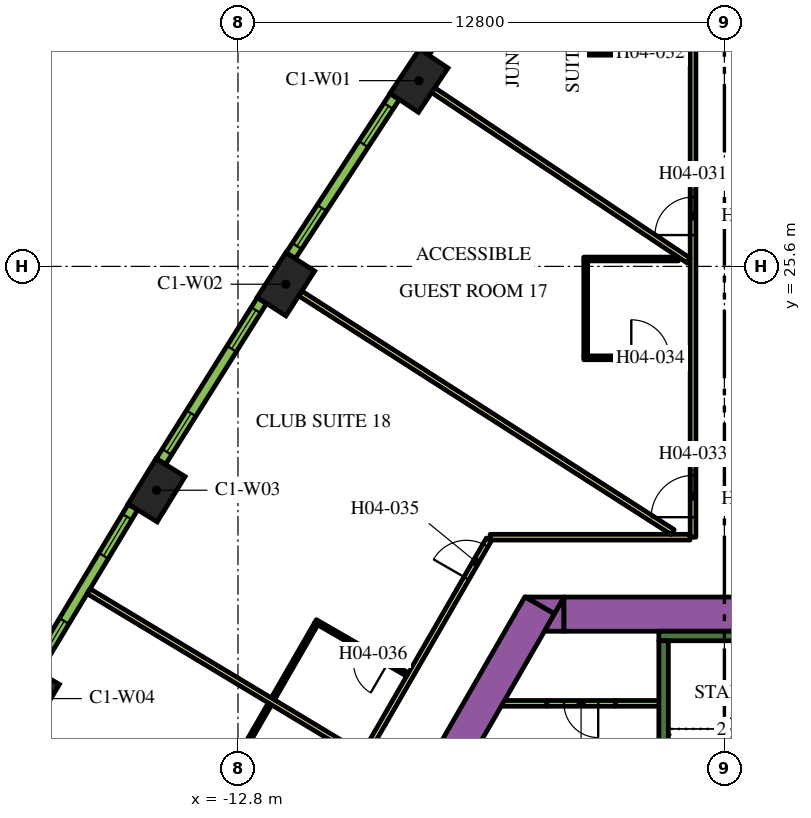
"""IFC4 building model, lengths in metres.
Left out: names, types, materials, properties, quantities, classifications, styles, units other than length and angle.
Written with IfcOpenShell. Run it as: python <this file> out.ifc"""

import sys

from ifc_helpers import new_model, si_unit, direction, frame, frame_2d, origin, origin_2d, place, context, subcontext, project, spatial, polyline, rectangle, outline, extrude, element, fill, save


model = new_model("IFC4")
c1 = context("Model", 3, precision=1e-05, world=origin(), true_north=direction((0.0, 1.0)))
c2 = subcontext(c1, "Body", "Model", "MODEL_VIEW")
j1 = project(units=[si_unit("LENGTHUNIT", "METRE"), si_unit("PLANEANGLEUNIT", "RADIAN")], contexts=[c1])
p1 = place(None, origin())
s1 = spatial("IfcSite", under=j1, at=p1, CompositionType="ELEMENT")
p2 = place(p1, origin())
s2 = spatial("IfcBuilding", under=s1, at=p2, CompositionType="ELEMENT")
p3 = place(p2, frame((0.0, 0.0, 66.6)))
s3 = spatial("IfcBuildingStorey", under=s2, at=p3, CompositionType="ELEMENT", Elevation=66.6)
for number, where, z_axis, x_axis in (
    (1, (-8.037, 30.487, 0.0), (0.0, 0.0, 1.0), (-0.555, -0.832, 0.0)),
    (2, (-11.539, 25.131, 0.0), (0.0, 0.0, 1.0), (-0.539, -0.842, 0.0)),
    (3, (-14.942, 19.71, 0.0), (0.0, 0.0, 1.0), (-0.524, -0.852, 0.0)),
    (4, (-18.243, 14.228, 0.0), (0.0, 0.0, 1.0), (-0.508, -0.861, 0.0)),
):
    element("IfcColumn", number, at=place(p3, frame(where, z_axis=z_axis, x_axis=x_axis)), inside=s3, PredefinedType="COLUMN", context=c2, shape_type="SweptSolid", body=[
        extrude(rectangle(XDim=1.4, YDim=0.9, at=origin_2d()), origin(), (0.0, 0.0, 1.0), 3.9),
    ])
p4 = place(p3, frame((-15.36, -1.503, 0.0), z_axis=(0.0, 0.0, 1.0), x_axis=(0.50000389221, 0.866023156604, 0.0)))
e5 = element("IfcWall", 5, at=p4, inside=s3, PredefinedType="SOLIDWALL", context=c2, shape_type="SweptSolid", body=[
    extrude(rectangle(XDim=21.0, YDim=0.9, at=frame_2d((10.5, 0.0))), origin(), (0.0, 0.0, 1.0), 3.9),
])
p5 = place(p3, origin())
e6 = element("IfcWall", 6, at=p5, inside=s3, PredefinedType="SOLIDWALL", context=c2, shape_type="SweptSolid", body=[
    extrude(outline(polyline([(-4.215, 16.9), (-4.469, 16.46), (-5.231, 16.9), (-4.215, 16.9)])), origin(), (0.0, 0.0, 1.0), 3.9),
])
p6 = place(p3, frame((-4.224, 16.45, 0.0), z_axis=(0.0, 0.0, 1.0), x_axis=(1.0, 0.0, 0.0)))
e7 = element("IfcWall", 7, at=p6, inside=s3, PredefinedType="SOLIDWALL", context=c2, shape_type="SweptSolid", body=[
    extrude(rectangle(XDim=9.488, YDim=0.9, at=frame_2d((4.744, 0.0))), origin(), (0.0, 0.0, 1.0), 3.9),
])
e8 = element("IfcWall", 8, at=p5, inside=s3, PredefinedType="SOLIDWALL", context=c2, shape_type="SweptSolid", body=[
    extrude(outline(polyline([(-4.734, 16.0), (-4.226, 16.88), (-4.226, 16.0), (-4.734, 16.0)])), origin(), (0.0, 0.0, 1.0), 3.9),
])
p7 = place(p3, frame((-1.725, 15.875, 0.0), z_axis=(0.0, 0.0, 1.0), x_axis=(1.0, 0.0, 0.0)))
e9 = element("IfcWall", 9, at=p7, inside=s3, PredefinedType="SOLIDWALL", context=c2, shape_type="SweptSolid", body=[
    extrude(rectangle(XDim=3.45, YDim=0.25, at=frame_2d((1.725, 0.0))), origin(), (0.0, 0.0, 1.0), 3.9),
])
p8 = place(p3, frame((-1.6, 8.7, 0.0), z_axis=(0.0, 0.0, 1.0), x_axis=(0.0, 1.0, 0.0)))
e10 = element("IfcWall", 10, at=p8, inside=s3, PredefinedType="SOLIDWALL", context=c2, shape_type="SweptSolid", body=[
    extrude(rectangle(XDim=7.05, YDim=0.25, at=frame_2d((3.525, 0.0))), origin(), (0.0, 0.0, 1.0), 3.9),
])
p9 = place(p3, frame((-5.851, 14.102, 0.0), z_axis=(0.0, 0.0, 1.0), x_axis=(1.0, 0.0, 0.0)))
e11 = element("IfcWall", 11, at=p9, inside=s3, PredefinedType="PARTITIONING", context=c2, shape_type="SweptSolid", body=[
    extrude(rectangle(XDim=1.18, YDim=0.15, at=frame_2d((0.59, 0.0))), origin(), (0.0, 0.0, 1.0), 2.75),
])
p10 = place(p3, frame((-2.871, 14.102, 0.0), z_axis=(0.0, 0.0, 1.0), x_axis=(1.0, 0.0, 0.0)))
e12 = element("IfcWall", 12, at=p10, inside=s3, PredefinedType="PARTITIONING", context=c2, shape_type="SweptSolid", body=[
    extrude(rectangle(XDim=1.196, YDim=0.15, at=frame_2d((0.598, 0.0))), origin(), (0.0, 0.0, 1.0), 2.75),
])
p11 = place(p3, frame((-2.871, 14.102, 0.0), z_axis=(0.0, 0.0, 1.0), x_axis=(-1.0, 0.0, 0.0)))
e13 = element("IfcWall", 13, at=p11, inside=s3, PredefinedType="PARTITIONING", context=c2, shape_type="SweptSolid", body=[
    extrude(rectangle(XDim=1.8, YDim=0.15, at=frame_2d((0.9, 0.0))), origin(), (0.0, 0.0, 1.0), 2.75),
])
p12 = place(p11, frame((0.45, 0.0, 0.0)))
e14 = element("IfcOpeningElement", 14, at=p12, cuts=e13, PredefinedType="OPENING", context=c2, shape_type="SweptSolid", body=[
    extrude(rectangle(XDim=0.9, YDim=2.1, at=frame_2d((0.45, 1.05))), frame((0.0, 0.085, 0.0), z_axis=(0.0, -1.0, 0.0), x_axis=(1.0, 0.0, 0.0)), (0.0, 0.0, 1.0), 0.17),
])
p13 = place(p3, frame((-0.825, 18.475, 0.0), z_axis=(0.0, 0.0, 1.0), x_axis=(0.0, 1.0, 0.0)))
e15 = element("IfcWall", 15, at=p13, inside=s3, PredefinedType="PARTITIONING", context=c2, shape_type="SweptSolid", body=[
    extrude(rectangle(XDim=16.224, YDim=0.15, at=frame_2d((8.112, 0.0))), origin(), (0.0, 0.0, 1.0), 2.75),
])
p14 = place(p13, frame((7.949, 0.0, 0.0)))
e16 = element("IfcOpeningElement", 16, at=p14, cuts=e15, PredefinedType="OPENING", context=c2, shape_type="SweptSolid", body=[
    extrude(rectangle(XDim=1.0, YDim=2.1, at=frame_2d((0.5, 1.05))), frame((0.0, 0.085, 0.0), z_axis=(0.0, -1.0, 0.0), x_axis=(1.0, 0.0, 0.0)), (0.0, 0.0, 1.0), 0.17),
])
p15 = place(p13, frame((0.526, 0.0, 0.0)))
e17 = element("IfcOpeningElement", 17, at=p15, cuts=e15, PredefinedType="OPENING", context=c2, shape_type="SweptSolid", body=[
    extrude(rectangle(XDim=1.1, YDim=2.1, at=frame_2d((0.55, 1.05))), frame((0.0, 0.085, 0.0), z_axis=(0.0, -1.0, 0.0), x_axis=(1.0, 0.0, 0.0)), (0.0, 0.0, 1.0), 0.17),
])
p16 = place(p3, frame((-6.163, 18.475, 0.0), z_axis=(0.0, 0.0, 1.0), x_axis=(1.0, 0.0, 0.0)))
e18 = element("IfcWall", 18, at=p16, inside=s3, PredefinedType="PARTITIONING", context=c2, shape_type="SweptSolid", body=[
    extrude(rectangle(XDim=5.258, YDim=0.15, at=frame_2d((2.629, 0.0))), origin(), (0.0, 0.0, 1.0), 2.75),
])
p17 = place(p3, frame((-19.081, -3.9, 0.0), z_axis=(0.0, 0.0, 1.0), x_axis=(0.499998313975, 0.866026377209, 0.0)))
e19 = element("IfcWall", 19, at=p17, inside=s3, PredefinedType="PARTITIONING", context=c2, shape_type="SweptSolid", body=[
    extrude(rectangle(XDim=25.766, YDim=0.15, at=frame_2d((12.883, 0.0))), origin(), (0.0, 0.0, 1.0), 2.75),
])
p18 = place(p17, frame((24.586, 0.0, 0.0)))
e20 = element("IfcOpeningElement", 20, at=p18, cuts=e19, PredefinedType="OPENING", context=c2, shape_type="SweptSolid", body=[
    extrude(rectangle(XDim=1.0, YDim=2.1, at=frame_2d((0.5, 1.05))), frame((0.0, 0.085, 0.0), z_axis=(0.0, -1.0, 0.0), x_axis=(1.0, 0.0, 0.0)), (0.0, 0.0, 1.0), 0.17),
])
p19 = place(p17, frame((9.948, 0.0, 0.0)))
e21 = element("IfcOpeningElement", 21, at=p19, cuts=e19, PredefinedType="OPENING", context=c2, shape_type="SweptSolid", body=[
    extrude(rectangle(XDim=1.0, YDim=2.1, at=frame_2d((0.5, 1.05))), frame((0.0, 0.085, 0.0), z_axis=(0.0, -1.0, 0.0), x_axis=(1.0, 0.0, 0.0)), (0.0, 0.0, 1.0), 0.17),
])
p20 = place(p17, frame((7.782, 0.0, 0.0)))
e22 = element("IfcOpeningElement", 22, at=p20, cuts=e19, PredefinedType="OPENING", context=c2, shape_type="SweptSolid", body=[
    extrude(rectangle(XDim=0.9, YDim=2.1, at=frame_2d((0.45, 1.05))), frame((0.0, 0.085, 0.0), z_axis=(0.0, -1.0, 0.0), x_axis=(1.0, 0.0, 0.0)), (0.0, 0.0, 1.0), 0.17),
])
p21 = place(p17, frame((4.658, 0.0, 0.0)))
e23 = element("IfcOpeningElement", 23, at=p21, cuts=e19, PredefinedType="OPENING", context=c2, shape_type="SweptSolid", body=[
    extrude(rectangle(XDim=0.9, YDim=2.1, at=frame_2d((0.45, 1.05))), frame((0.0, 0.085, 0.0), z_axis=(0.0, -1.0, 0.0), x_axis=(1.0, 0.0, 0.0)), (0.0, 0.0, 1.0), 0.17),
])
p22 = place(p3, frame((-16.729, 17.052, 0.0), z_axis=(0.0, 0.0, 1.0), x_axis=(0.856630606266, -0.515930232113, 0.0)))
e24 = element("IfcWall", 24, at=p22, inside=s3, PredefinedType="PARTITIONING", context=c2, shape_type="SweptSolid", body=[
    extrude(rectangle(XDim=8.355, YDim=0.15, at=frame_2d((4.178, 0.0))), origin(), (0.0, 0.0, 1.0), 2.75),
])
p23 = place(p3, frame((-11.16, 24.888, 0.0), z_axis=(0.0, 0.0, 1.0), x_axis=(0.84199813156, -0.539480441211, 0.0)))
e25 = element("IfcWall", 25, at=p23, inside=s3, PredefinedType="PARTITIONING", context=c2, shape_type="SweptSolid", body=[
    extrude(rectangle(XDim=11.638, YDim=0.15, at=frame_2d((5.819, 0.0))), origin(), (0.0, 0.0, 1.0), 2.75),
])
p24 = place(p3, frame((-7.662, 30.238, 0.0), z_axis=(0.0, 0.0, 1.0), x_axis=(0.831882886825, -0.554951225431, 0.0)))
e26 = element("IfcWall", 26, at=p24, inside=s3, PredefinedType="PARTITIONING", context=c2, shape_type="SweptSolid", body=[
    extrude(rectangle(XDim=8.079, YDim=0.15, at=frame_2d((4.04, 0.0))), origin(), (0.0, 0.0, 1.0), 2.75),
])
p25 = place(p3, frame((-3.6, 31.208, 0.0), z_axis=(0.0, 0.0, 1.0), x_axis=(1.0, 0.0, 0.0)))
e27 = element("IfcWall", 27, at=p25, inside=s3, PredefinedType="PARTITIONING", context=c2, shape_type="SweptSolid", body=[
    extrude(rectangle(XDim=2.7, YDim=0.1, at=frame_2d((1.35, 0.0))), origin(), (0.0, 0.0, 1.0), 2.75),
])
p26 = place(p25, frame((1.2, 0.0, 0.0)))
e28 = element("IfcOpeningElement", 28, at=p26, cuts=e27, PredefinedType="OPENING", context=c2, shape_type="SweptSolid", body=[
    extrude(rectangle(XDim=0.9, YDim=2.1, at=frame_2d((0.45, 1.05))), frame((0.0, 0.06, 0.0), z_axis=(0.0, -1.0, 0.0), x_axis=(1.0, 0.0, 0.0)), (0.0, 0.0, 1.0), 0.12),
])
p27 = place(p3, frame((-3.7, 23.195, 0.0), z_axis=(0.0, 0.0, 1.0), x_axis=(1.0, 0.0, 0.0)))
e29 = element("IfcWall", 29, at=p27, inside=s3, PredefinedType="PARTITIONING", context=c2, shape_type="SweptSolid", body=[
    extrude(rectangle(XDim=2.8, YDim=0.1, at=frame_2d((1.4, 0.0))), origin(), (0.0, 0.0, 1.0), 2.75),
])
p28 = place(p27, frame((1.25, 0.0, 0.0)))
e30 = element("IfcOpeningElement", 30, at=p28, cuts=e29, PredefinedType="OPENING", context=c2, shape_type="SweptSolid", body=[
    extrude(rectangle(XDim=1.0, YDim=2.1, at=frame_2d((0.5, 1.05))), frame((0.0, 0.06, 0.0), z_axis=(0.0, -1.0, 0.0), x_axis=(1.0, 0.0, 0.0)), (0.0, 0.0, 1.0), 0.12),
])
p29 = place(p3, frame((-3.65, 23.245, 0.0), z_axis=(0.0, 0.0, 1.0), x_axis=(0.0, 1.0, 0.0)))
e31 = element("IfcWall", 31, at=p29, inside=s3, PredefinedType="PARTITIONING", context=c2, shape_type="SweptSolid", body=[
    extrude(rectangle(XDim=2.5, YDim=0.1, at=frame_2d((1.25, 0.0))), origin(), (0.0, 0.0, 1.0), 2.75),
])
p30 = place(p3, frame((-1.21, 25.795, 0.0), z_axis=(0.0, 0.0, 1.0), x_axis=(-1.0, 0.0, 0.0)))
e32 = element("IfcWall", 32, at=p30, inside=s3, PredefinedType="PARTITIONING", context=c2, shape_type="SweptSolid", body=[
    extrude(rectangle(XDim=2.49, YDim=0.1, at=frame_2d((1.245, 0.0))), origin(), (0.0, 0.0, 1.0), 2.75),
])
p31 = place(p3, frame((-8.337, 14.861, 0.0), z_axis=(0.0, 0.0, 1.0), x_axis=(-0.866034573852, 0.49998411664, 0.0)))
e33 = element("IfcWall", 33, at=p31, inside=s3, PredefinedType="PARTITIONING", context=c2, shape_type="SweptSolid", body=[
    extrude(rectangle(XDim=2.8, YDim=0.1, at=frame_2d((1.4, 0.0))), origin(), (0.0, 0.0, 1.0), 2.75),
])
p32 = place(p31, frame((0.6, 0.0, 0.0)))
e34 = element("IfcOpeningElement", 34, at=p32, cuts=e33, PredefinedType="OPENING", context=c2, shape_type="SweptSolid", body=[
    extrude(rectangle(XDim=0.9, YDim=2.1, at=frame_2d((0.45, 1.05))), frame((0.0, 0.06, 0.0), z_axis=(0.0, -1.0, 0.0), x_axis=(1.0, 0.0, 0.0)), (0.0, 0.0, 1.0), 0.12),
])
p33 = place(p3, frame((-10.743, 16.192, 0.0), z_axis=(0.0, 0.0, 1.0), x_axis=(-0.500014167291, -0.866017224141, 0.0)))
e35 = element("IfcWall", 35, at=p33, inside=s3, PredefinedType="PARTITIONING", context=c2, shape_type="SweptSolid", body=[
    extrude(rectangle(XDim=2.27, YDim=0.1, at=frame_2d((1.135, 0.0))), origin(), (0.0, 0.0, 1.0), 2.75),
])
p34 = place(p3, frame((-13.147, 12.029, 0.0), z_axis=(0.0, 0.0, 1.0), x_axis=(0.499939447199, 0.866060361138, 0.0)))
e36 = element("IfcWall", 36, at=p34, inside=s3, PredefinedType="PARTITIONING", context=c2, shape_type="SweptSolid", body=[
    extrude(rectangle(XDim=2.37, YDim=0.1, at=frame_2d((1.185, 0.0))), origin(), (0.0, 0.0, 1.0), 2.75),
])
p35 = place(p3, frame((-5.078, 35.376, 0.0), z_axis=(0.0, 0.0, 1.0), x_axis=(-0.562610153679, -0.826722332454, 0.0)))
e37 = element("IfcWall", 37, at=p35, inside=s3, PredefinedType="SOLIDWALL", context=c2, shape_type="SweptSolid", body=[
    extrude(rectangle(XDim=5.006, YDim=0.29, at=frame_2d((2.503, 0.0))), origin(), (0.0, 0.0, 1.0), 3.65),
])
p36 = place(p35, frame((0.265, 0.0, 0.9)))
e38 = element("IfcOpeningElement", 38, at=p36, cuts=e37, PredefinedType="OPENING", context=c2, shape_type="SweptSolid", body=[
    extrude(rectangle(XDim=1.2, YDim=2.15, at=frame_2d((0.6, 1.075))), frame((0.0, 0.155, 0.0), z_axis=(0.0, -1.0, 0.0), x_axis=(1.0, 0.0, 0.0)), (0.0, 0.0, 1.0), 0.31),
])
p37 = place(p35, frame((3.495, 0.0, 0.9)))
e39 = element("IfcOpeningElement", 39, at=p37, cuts=e37, PredefinedType="OPENING", context=c2, shape_type="SweptSolid", body=[
    extrude(rectangle(XDim=1.2, YDim=2.15, at=frame_2d((0.6, 1.075))), frame((0.0, 0.155, 0.0), z_axis=(0.0, -1.0, 0.0), x_axis=(1.0, 0.0, 0.0)), (0.0, 0.0, 1.0), 0.31),
])
p38 = place(p3, frame((-8.676, 30.068, 0.0), z_axis=(0.0, 0.0, 1.0), x_axis=(-0.547204617628, -0.836998868845, 0.0)))
e40 = element("IfcWall", 40, at=p38, inside=s3, PredefinedType="SOLIDWALL", context=c2, shape_type="SweptSolid", body=[
    extrude(rectangle(XDim=4.998, YDim=0.29, at=frame_2d((2.499, 0.0))), origin(), (0.0, 0.0, 1.0), 3.65),
])
p39 = place(p38, frame((0.297, 0.0, 0.9)))
e41 = element("IfcOpeningElement", 41, at=p39, cuts=e40, PredefinedType="OPENING", context=c2, shape_type="SweptSolid", body=[
    extrude(rectangle(XDim=1.2, YDim=2.15, at=frame_2d((0.6, 1.075))), frame((0.0, 0.155, 0.0), z_axis=(0.0, -1.0, 0.0), x_axis=(1.0, 0.0, 0.0)), (0.0, 0.0, 1.0), 0.31),
])
p40 = place(p38, frame((3.501, 0.0, 0.9)))
e42 = element("IfcOpeningElement", 42, at=p40, cuts=e40, PredefinedType="OPENING", context=c2, shape_type="SweptSolid", body=[
    extrude(rectangle(XDim=1.2, YDim=2.15, at=frame_2d((0.6, 1.075))), frame((0.0, 0.155, 0.0), z_axis=(0.0, -1.0, 0.0), x_axis=(1.0, 0.0, 0.0)), (0.0, 0.0, 1.0), 0.31),
])
p41 = place(p3, frame((-12.17, 24.699, 0.0), z_axis=(0.0, 0.0, 1.0), x_axis=(-0.531688286542, -0.846940119462, 0.0)))
e43 = element("IfcWall", 43, at=p41, inside=s3, PredefinedType="SOLIDWALL", context=c2, shape_type="SweptSolid", body=[
    extrude(rectangle(XDim=4.998, YDim=0.29, at=frame_2d((2.499, 0.0))), origin(), (0.0, 0.0, 1.0), 3.65),
])
p42 = place(p41, frame((0.297, 0.0, 0.9)))
e44 = element("IfcOpeningElement", 44, at=p42, cuts=e43, PredefinedType="OPENING", context=c2, shape_type="SweptSolid", body=[
    extrude(rectangle(XDim=1.2, YDim=2.15, at=frame_2d((0.6, 1.075))), frame((0.0, 0.155, 0.0), z_axis=(0.0, -1.0, 0.0), x_axis=(1.0, 0.0, 0.0)), (0.0, 0.0, 1.0), 0.31),
])
p43 = place(p41, frame((3.501, 0.0, 0.9)))
e45 = element("IfcOpeningElement", 45, at=p43, cuts=e43, PredefinedType="OPENING", context=c2, shape_type="SweptSolid", body=[
    extrude(rectangle(XDim=1.2, YDim=2.15, at=frame_2d((0.6, 1.075))), frame((0.0, 0.155, 0.0), z_axis=(0.0, -1.0, 0.0), x_axis=(1.0, 0.0, 0.0)), (0.0, 0.0, 1.0), 0.31),
])
p44 = place(p3, frame((-15.564, 19.267, 0.0), z_axis=(0.0, 0.0, 1.0), x_axis=(-0.515938796285, -0.856625448191, 0.0)))
e46 = element("IfcWall", 46, at=p44, inside=s3, PredefinedType="SOLIDWALL", context=c2, shape_type="SweptSolid", body=[
    extrude(rectangle(XDim=4.998, YDim=0.29, at=frame_2d((2.499, 0.0))), origin(), (0.0, 0.0, 1.0), 3.65),
])
p45 = place(p44, frame((0.297, 0.0, 0.9)))
e47 = element("IfcOpeningElement", 47, at=p45, cuts=e46, PredefinedType="OPENING", context=c2, shape_type="SweptSolid", body=[
    extrude(rectangle(XDim=1.2, YDim=2.15, at=frame_2d((0.6, 1.075))), frame((0.0, 0.155, 0.0), z_axis=(0.0, -1.0, 0.0), x_axis=(1.0, 0.0, 0.0)), (0.0, 0.0, 1.0), 0.31),
])
p46 = place(p44, frame((3.501, 0.0, 0.9)))
e48 = element("IfcOpeningElement", 48, at=p46, cuts=e46, PredefinedType="OPENING", context=c2, shape_type="SweptSolid", body=[
    extrude(rectangle(XDim=1.2, YDim=2.15, at=frame_2d((0.6, 1.075))), frame((0.0, 0.155, 0.0), z_axis=(0.0, -1.0, 0.0), x_axis=(1.0, 0.0, 0.0)), (0.0, 0.0, 1.0), 0.31),
])
p47 = place(p12, origin())
e49 = element("IfcDoor", 49, at=p47, inside=s3, OperationType="SINGLE_SWING_LEFT", PredefinedType="DOOR", context=c2, shape_type="SweptSolid", body=[
    extrude(rectangle(XDim=0.9, YDim=2.1, at=frame_2d((0.45, 1.05))), frame((0.0, 0.025, 0.0), z_axis=(0.0, -1.0, 0.0), x_axis=(1.0, 0.0, 0.0)), (0.0, 0.0, 1.0), 0.05),
])
fill(e14, e49)
p48 = place(p14, origin())
e50 = element("IfcDoor", 50, at=p48, inside=s3, OperationType="SINGLE_SWING_LEFT", PredefinedType="DOOR", context=c2, shape_type="SweptSolid", body=[
    extrude(rectangle(XDim=1.0, YDim=2.1, at=frame_2d((0.5, 1.05))), frame((0.0, 0.025, 0.0), z_axis=(0.0, -1.0, 0.0), x_axis=(1.0, 0.0, 0.0)), (0.0, 0.0, 1.0), 0.05),
])
fill(e16, e50)
p49 = place(p26, origin())
e51 = element("IfcDoor", 51, at=p49, inside=s3, OperationType="SINGLE_SWING_LEFT", PredefinedType="DOOR", context=c2, shape_type="SweptSolid", body=[
    extrude(rectangle(XDim=0.9, YDim=2.1, at=frame_2d((0.45, 1.05))), frame((0.0, 0.025, 0.0), z_axis=(0.0, -1.0, 0.0), x_axis=(1.0, 0.0, 0.0)), (0.0, 0.0, 1.0), 0.05),
])
fill(e28, e51)
p50 = place(p15, origin())
e52 = element("IfcDoor", 52, at=p50, inside=s3, OperationType="SINGLE_SWING_LEFT", PredefinedType="DOOR", context=c2, shape_type="SweptSolid", body=[
    extrude(rectangle(XDim=1.1, YDim=2.1, at=frame_2d((0.55, 1.05))), frame((0.0, 0.025, 0.0), z_axis=(0.0, -1.0, 0.0), x_axis=(1.0, 0.0, 0.0)), (0.0, 0.0, 1.0), 0.05),
])
fill(e17, e52)
p51 = place(p28, origin())
e53 = element("IfcDoor", 53, at=p51, inside=s3, OperationType="SINGLE_SWING_LEFT", PredefinedType="DOOR", context=c2, shape_type="SweptSolid", body=[
    extrude(rectangle(XDim=1.0, YDim=2.1, at=frame_2d((0.5, 1.05))), frame((0.0, 0.025, 0.0), z_axis=(0.0, -1.0, 0.0), x_axis=(1.0, 0.0, 0.0)), (0.0, 0.0, 1.0), 0.05),
])
fill(e30, e53)
p52 = place(p18, origin())
e54 = element("IfcDoor", 54, at=p52, inside=s3, OperationType="SINGLE_SWING_RIGHT", PredefinedType="DOOR", context=c2, shape_type="SweptSolid", body=[
    extrude(rectangle(XDim=1.0, YDim=2.1, at=frame_2d((0.5, 1.05))), frame((0.0, 0.025, 0.0), z_axis=(0.0, -1.0, 0.0), x_axis=(1.0, 0.0, 0.0)), (0.0, 0.0, 1.0), 0.05),
])
fill(e20, e54)
p53 = place(p32, origin())
e55 = element("IfcDoor", 55, at=p53, inside=s3, OperationType="SINGLE_SWING_RIGHT", PredefinedType="DOOR", context=c2, shape_type="SweptSolid", body=[
    extrude(rectangle(XDim=0.9, YDim=2.1, at=frame_2d((0.45, 1.05))), frame((0.0, 0.025, 0.0), z_axis=(0.0, -1.0, 0.0), x_axis=(1.0, 0.0, 0.0)), (0.0, 0.0, 1.0), 0.05),
])
fill(e34, e55)
p54 = place(p39, origin())
e56 = element("IfcWindow", 56, at=p54, inside=s3, PartitioningType="DOUBLE_PANEL_VERTICAL", PredefinedType="WINDOW", context=c2, shape_type="SweptSolid", body=[
    extrude(rectangle(XDim=1.2, YDim=2.15, at=frame_2d((0.6, 1.075))), frame((0.0, 0.015, 0.0), z_axis=(0.0, -1.0, 0.0), x_axis=(1.0, 0.0, 0.0)), (0.0, 0.0, 1.0), 0.06),
])
fill(e41, e56)
p55 = place(p40, origin())
e57 = element("IfcWindow", 57, at=p55, inside=s3, PartitioningType="DOUBLE_PANEL_VERTICAL", PredefinedType="WINDOW", context=c2, shape_type="SweptSolid", body=[
    extrude(rectangle(XDim=1.2, YDim=2.15, at=frame_2d((0.6, 1.075))), frame((0.0, 0.015, 0.0), z_axis=(0.0, -1.0, 0.0), x_axis=(1.0, 0.0, 0.0)), (0.0, 0.0, 1.0), 0.06),
])
fill(e42, e57)
p56 = place(p42, origin())
e58 = element("IfcWindow", 58, at=p56, inside=s3, PartitioningType="DOUBLE_PANEL_VERTICAL", PredefinedType="WINDOW", context=c2, shape_type="SweptSolid", body=[
    extrude(rectangle(XDim=1.2, YDim=2.15, at=frame_2d((0.6, 1.075))), frame((0.0, 0.015, 0.0), z_axis=(0.0, -1.0, 0.0), x_axis=(1.0, 0.0, 0.0)), (0.0, 0.0, 1.0), 0.06),
])
fill(e44, e58)
p57 = place(p43, origin())
e59 = element("IfcWindow", 59, at=p57, inside=s3, PartitioningType="DOUBLE_PANEL_VERTICAL", PredefinedType="WINDOW", context=c2, shape_type="SweptSolid", body=[
    extrude(rectangle(XDim=1.2, YDim=2.15, at=frame_2d((0.6, 1.075))), frame((0.0, 0.015, 0.0), z_axis=(0.0, -1.0, 0.0), x_axis=(1.0, 0.0, 0.0)), (0.0, 0.0, 1.0), 0.06),
])
fill(e45, e59)
p58 = place(p45, origin())
e60 = element("IfcWindow", 60, at=p58, inside=s3, PartitioningType="DOUBLE_PANEL_VERTICAL", PredefinedType="WINDOW", context=c2, shape_type="SweptSolid", body=[
    extrude(rectangle(XDim=1.2, YDim=2.15, at=frame_2d((0.6, 1.075))), frame((0.0, 0.015, 0.0), z_axis=(0.0, -1.0, 0.0), x_axis=(1.0, 0.0, 0.0)), (0.0, 0.0, 1.0), 0.06),
])
fill(e47, e60)
p59 = place(p46, origin())
e61 = element("IfcWindow", 61, at=p59, inside=s3, PartitioningType="DOUBLE_PANEL_VERTICAL", PredefinedType="WINDOW", context=c2, shape_type="SweptSolid", body=[
    extrude(rectangle(XDim=1.2, YDim=2.15, at=frame_2d((0.6, 1.075))), frame((0.0, 0.015, 0.0), z_axis=(0.0, -1.0, 0.0), x_axis=(1.0, 0.0, 0.0)), (0.0, 0.0, 1.0), 0.06),
])
fill(e48, e61)
save(model, sys.argv[1])
